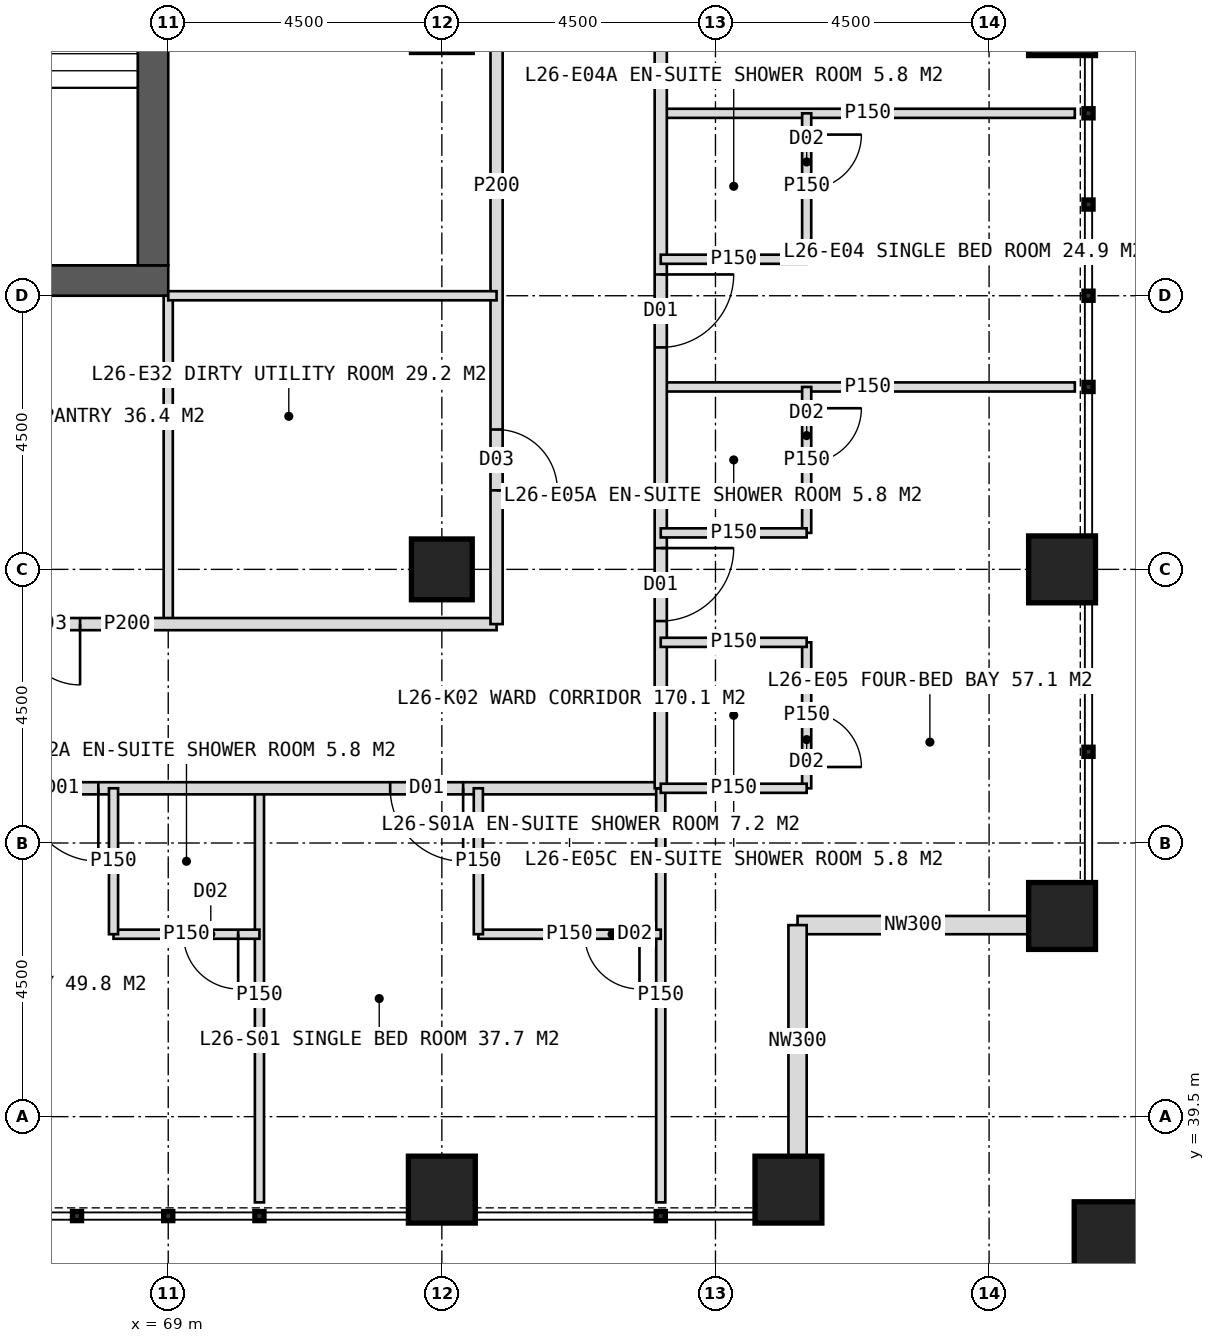
"""IFC4 building model, lengths in metres.
Left out: names, types, materials, properties, quantities, classifications, styles, units other than length and angle.
Written with IfcOpenShell. Run it as: python <this file> out.ifc"""

import sys

from ifc_helpers import new_model, si_unit, direction, frame, frame_2d, origin, origin_2d, place, context, subcontext, project, spatial, rectangle, hollow_rectangle, extrude, element, fill, save


model = new_model("IFC4")
c1 = context("Model", 3, precision=1e-05, world=origin(), true_north=direction((0.0, 1.0)))
c2 = subcontext(c1, "Body", "Model", "MODEL_VIEW")
j1 = project(units=[si_unit("LENGTHUNIT", "METRE"), si_unit("PLANEANGLEUNIT", "RADIAN")], contexts=[c1])
p1 = place(None, origin())
s1 = spatial("IfcSite", under=j1, at=p1, CompositionType="ELEMENT")
p2 = place(p1, origin())
s2 = spatial("IfcBuilding", under=s1, at=p2, CompositionType="ELEMENT")
p3 = place(p2, frame((0.0, 0.0, 112.0)))
s3 = spatial("IfcBuildingStorey", under=s2, at=p3, CompositionType="ELEMENT", Elevation=112.0)
p4 = place(p3, frame((51.0, 53.25, 0.0), z_axis=(0.0, 0.0, 1.0), x_axis=(1.0, 0.0, 0.0)))
e1 = element("IfcWall", 1, at=p4, inside=s3, PredefinedType="SHEAR", context=c2, shape_type="SweptSolid", body=[
    extrude(rectangle(XDim=18.0, YDim=0.5, at=frame_2d((9.0, 0.0))), origin(), (0.0, 0.0, 1.0), 4.0),
])
p5 = place(p4, frame((8.1, 0.0, 0.0)))
e2 = element("IfcOpeningElement", 2, at=p5, cuts=e1, PredefinedType="OPENING", context=c2, shape_type="SweptSolid", body=[
    extrude(rectangle(XDim=1.8, YDim=2.2, at=frame_2d((0.9, 1.1))), frame((0.0, 0.26, 0.0), z_axis=(0.0, -1.0, 0.0), x_axis=(1.0, 0.0, 0.0)), (0.0, 0.0, 1.0), 0.52),
])
p6 = place(p3, frame((68.75, 53.5, 0.0), z_axis=(0.0, 0.0, 1.0), x_axis=(0.0, 1.0, 0.0)))
e3 = element("IfcWall", 3, at=p6, inside=s3, PredefinedType="SHEAR", context=c2, shape_type="SweptSolid", body=[
    extrude(rectangle(XDim=17.0, YDim=0.5, at=frame_2d((8.5, 0.0))), origin(), (0.0, 0.0, 1.0), 4.0),
])
p7 = place(p6, frame((9.5, 0.0, 0.0)))
e4 = element("IfcOpeningElement", 4, at=p7, cuts=e3, PredefinedType="OPENING", context=c2, shape_type="SweptSolid", body=[
    extrude(rectangle(XDim=1.5, YDim=2.2, at=frame_2d((0.75, 1.1))), frame((0.0, 0.26, 0.0), z_axis=(0.0, -1.0, 0.0), x_axis=(1.0, 0.0, 0.0)), (0.0, 0.0, 1.0), 0.52),
])
p8 = place(p3, frame((73.5, 48.5, 0.0), z_axis=(0.0, 0.0, 1.0), x_axis=(1.0, 0.0, 0.0)))
e5 = element("IfcColumn", 5, at=p8, inside=s3, PredefinedType="COLUMN", context=c2, shape_type="SweptSolid", body=[
    extrude(hollow_rectangle(XDim=1.0, YDim=1.0, WallThickness=0.1, at=origin_2d()), origin(), (0.0, 0.0, 1.0), 4.0),
])
for number, where, z_axis, x_axis in (
    (6, (83.7, 42.8, 0.0), (0.0, 0.0, 1.0), (1.0, 0.0, 0.0)),
    (7, (83.7, 48.5, 0.0), (0.0, 0.0, 1.0), (1.0, 0.0, 0.0)),
    (8, (83.7, 57.5, 0.0), (0.0, 0.0, 1.0), (1.0, 0.0, 0.0)),
    (9, (73.5, 38.3, 0.0), (0.0, 0.0, 1.0), (1.0, 0.0, 0.0)),
    (10, (79.2, 38.3, 0.0), (0.0, 0.0, 1.0), (1.0, 0.0, 0.0)),
):
    element("IfcColumn", number, at=place(p3, frame(where, z_axis=z_axis, x_axis=x_axis)), inside=s3, PredefinedType="COLUMN", context=c2, shape_type="SweptSolid", body=[
        extrude(hollow_rectangle(XDim=1.1, YDim=1.1, WallThickness=0.1, at=origin_2d()), origin(), (0.0, 0.0, 1.0), 4.0),
    ])
p9 = place(p3, frame((84.6, 37.4, 0.0), z_axis=(0.0, 0.0, 1.0), x_axis=(1.0, 0.0, 0.0)))
e11 = element("IfcColumn", 11, at=p9, inside=s3, PredefinedType="COLUMN", context=c2, shape_type="SweptSolid", body=[
    extrude(hollow_rectangle(XDim=1.4, YDim=1.4, WallThickness=0.08, at=origin_2d()), origin(), (0.0, 0.0, 1.0), 4.0),
])
for number, where, z_axis, x_axis in (
    (12, (83.15, 42.65, 0.0), (0.0, 0.0, 1.0), (-1.0, 0.0, 0.0)),
    (13, (79.35, 42.65, 0.0), (0.0, 0.0, 1.0), (0.0, -1.0, 0.0)),
):
    element("IfcWall", number, at=place(p3, frame(where, z_axis=z_axis, x_axis=x_axis)), inside=s3, PredefinedType="ELEMENTEDWALL", context=c2, shape_type="SweptSolid", body=[
        extrude(rectangle(XDim=3.8, YDim=0.3, at=frame_2d((1.9, 0.0))), origin(), (0.0, 0.0, 1.0), 4.0),
    ])
p10 = place(p3, frame((70.5, 44.9, 0.0), z_axis=(0.0, 0.0, 1.0), x_axis=(0.0, -1.0, 0.0)))
e14 = element("IfcWall", 14, at=p10, inside=s3, PredefinedType="PARTITIONING", context=c2, shape_type="SweptSolid", body=[
    extrude(rectangle(XDim=6.81, YDim=0.15, at=frame_2d((3.405, 0.0))), origin(), (0.0, 0.0, 1.0), 3.75),
])
p11 = place(p3, frame((77.1, 44.9, 0.0), z_axis=(0.0, 0.0, 1.0), x_axis=(-1.0, 0.0, 0.0)))
e15 = element("IfcWall", 15, at=p11, inside=s3, PredefinedType="PARTITIONING", context=c2, shape_type="SweptSolid", body=[
    extrude(rectangle(XDim=34.2, YDim=0.2, at=frame_2d((17.1, 0.0))), origin(), (0.0, 0.0, 1.0), 3.75),
])
p12 = place(p11, frame((3.25, 0.0, 0.0)))
e16 = element("IfcOpeningElement", 16, at=p12, cuts=e15, PredefinedType="OPENING", context=c2, shape_type="SweptSolid", body=[
    extrude(rectangle(XDim=1.2, YDim=2.2, at=frame_2d((0.6, 1.1))), frame((0.0, 0.11, 0.0), z_axis=(0.0, -1.0, 0.0), x_axis=(1.0, 0.0, 0.0)), (0.0, 0.0, 1.0), 0.22),
])
p13 = place(p11, frame((9.25, 0.0, 0.0)))
e17 = element("IfcOpeningElement", 17, at=p13, cuts=e15, PredefinedType="OPENING", context=c2, shape_type="SweptSolid", body=[
    extrude(rectangle(XDim=1.2, YDim=2.2, at=frame_2d((0.6, 1.1))), frame((0.0, 0.11, 0.0), z_axis=(0.0, -1.0, 0.0), x_axis=(1.0, 0.0, 0.0)), (0.0, 0.0, 1.0), 0.22),
])
p14 = place(p11, frame((18.25, 0.0, 0.0)))
e18 = element("IfcOpeningElement", 18, at=p14, cuts=e15, PredefinedType="OPENING", context=c2, shape_type="SweptSolid", body=[
    extrude(rectangle(XDim=1.2, YDim=2.2, at=frame_2d((0.6, 1.1))), frame((0.0, 0.11, 0.0), z_axis=(0.0, -1.0, 0.0), x_axis=(1.0, 0.0, 0.0)), (0.0, 0.0, 1.0), 0.22),
])
p15 = place(p11, frame((27.25, 0.0, 0.0)))
e19 = element("IfcOpeningElement", 19, at=p15, cuts=e15, PredefinedType="OPENING", context=c2, shape_type="SweptSolid", body=[
    extrude(rectangle(XDim=1.2, YDim=2.2, at=frame_2d((0.6, 1.1))), frame((0.0, 0.11, 0.0), z_axis=(0.0, -1.0, 0.0), x_axis=(1.0, 0.0, 0.0)), (0.0, 0.0, 1.0), 0.22),
])
p16 = place(p3, frame((77.1, 44.9, 0.0), z_axis=(0.0, 0.0, 1.0), x_axis=(0.0, -1.0, 0.0)))
e20 = element("IfcWall", 20, at=p16, inside=s3, PredefinedType="PARTITIONING", context=c2, shape_type="SweptSolid", body=[
    extrude(rectangle(XDim=6.81, YDim=0.15, at=frame_2d((3.405, 0.0))), origin(), (0.0, 0.0, 1.0), 3.75),
])
p17 = place(p3, frame((77.1, 42.5, 0.0), z_axis=(0.0, 0.0, 1.0), x_axis=(-1.0, 0.0, 0.0)))
e21 = element("IfcWall", 21, at=p17, inside=s3, PredefinedType="PARTITIONING", context=c2, shape_type="SweptSolid", body=[
    extrude(rectangle(XDim=3.0, YDim=0.15, at=frame_2d((1.5, 0.0))), origin(), (0.0, 0.0, 1.0), 3.75),
])
p18 = place(p17, frame((0.35, 0.0, 0.0)))
e22 = element("IfcOpeningElement", 22, at=p18, cuts=e21, PredefinedType="OPENING", context=c2, shape_type="SweptSolid", body=[
    extrude(rectangle(XDim=0.9, YDim=2.1, at=frame_2d((0.45, 1.05))), frame((0.0, 0.085, 0.0), z_axis=(0.0, -1.0, 0.0), x_axis=(1.0, 0.0, 0.0)), (0.0, 0.0, 1.0), 0.17),
])
p19 = place(p3, frame((74.1, 44.9, 0.0), z_axis=(0.0, 0.0, 1.0), x_axis=(0.0, -1.0, 0.0)))
e23 = element("IfcWall", 23, at=p19, inside=s3, PredefinedType="PARTITIONING", context=c2, shape_type="SweptSolid", body=[
    extrude(rectangle(XDim=2.4, YDim=0.15, at=frame_2d((1.2, 0.0))), origin(), (0.0, 0.0, 1.0), 3.75),
])
p20 = place(p3, frame((70.5, 42.5, 0.0), z_axis=(0.0, 0.0, 1.0), x_axis=(-1.0, 0.0, 0.0)))
e24 = element("IfcWall", 24, at=p20, inside=s3, PredefinedType="PARTITIONING", context=c2, shape_type="SweptSolid", body=[
    extrude(rectangle(XDim=2.4, YDim=0.15, at=frame_2d((1.2, 0.0))), origin(), (0.0, 0.0, 1.0), 3.75),
])
p21 = place(p20, frame((0.35, 0.0, 0.0)))
e25 = element("IfcOpeningElement", 25, at=p21, cuts=e24, PredefinedType="OPENING", context=c2, shape_type="SweptSolid", body=[
    extrude(rectangle(XDim=0.9, YDim=2.1, at=frame_2d((0.45, 1.05))), frame((0.0, 0.085, 0.0), z_axis=(0.0, -1.0, 0.0), x_axis=(1.0, 0.0, 0.0)), (0.0, 0.0, 1.0), 0.17),
])
p22 = place(p3, frame((68.1, 44.9, 0.0), z_axis=(0.0, 0.0, 1.0), x_axis=(0.0, -1.0, 0.0)))
e26 = element("IfcWall", 26, at=p22, inside=s3, PredefinedType="PARTITIONING", context=c2, shape_type="SweptSolid", body=[
    extrude(rectangle(XDim=2.4, YDim=0.15, at=frame_2d((1.2, 0.0))), origin(), (0.0, 0.0, 1.0), 3.75),
])
p23 = place(p3, frame((69.0, 53.0, 0.0), z_axis=(0.0, 0.0, 1.0), x_axis=(0.0, -1.0, 0.0)))
e27 = element("IfcWall", 27, at=p23, inside=s3, PredefinedType="PARTITIONING", context=c2, shape_type="SweptSolid", body=[
    extrude(rectangle(XDim=5.4, YDim=0.15, at=frame_2d((2.7, 0.0))), origin(), (0.0, 0.0, 1.0), 3.75),
])
p24 = place(p3, frame((74.4, 47.6, 0.0), z_axis=(0.0, 0.0, 1.0), x_axis=(-1.0, 0.0, 0.0)))
e28 = element("IfcWall", 28, at=p24, inside=s3, PredefinedType="PARTITIONING", context=c2, shape_type="SweptSolid", body=[
    extrude(rectangle(XDim=12.15, YDim=0.2, at=frame_2d((6.075, 0.0))), origin(), (0.0, 0.0, 1.0), 3.75),
])
p25 = place(p24, frame((6.85, 0.0, 0.0)))
e29 = element("IfcOpeningElement", 29, at=p25, cuts=e28, PredefinedType="OPENING", context=c2, shape_type="SweptSolid", body=[
    extrude(rectangle(XDim=1.0, YDim=2.1, at=frame_2d((0.5, 1.05))), frame((0.0, 0.11, 0.0), z_axis=(0.0, -1.0, 0.0), x_axis=(1.0, 0.0, 0.0)), (0.0, 0.0, 1.0), 0.22),
])
for number, where, z_axis, x_axis in (
    (30, (77.1, 56.0, 0.0), (0.0, 0.0, 1.0), (1.0, 0.0, 0.0)),
    (31, (77.1, 51.5, 0.0), (0.0, 0.0, 1.0), (1.0, 0.0, 0.0)),
):
    element("IfcWall", number, at=place(p3, frame(where, z_axis=z_axis, x_axis=x_axis)), inside=s3, PredefinedType="PARTITIONING", context=c2, shape_type="SweptSolid", body=[
        extrude(rectangle(XDim=6.81, YDim=0.15, at=frame_2d((3.405, 0.0))), origin(), (0.0, 0.0, 1.0), 3.75),
    ])
p26 = place(p3, frame((77.1, 79.1, 0.0), z_axis=(0.0, 0.0, 1.0), x_axis=(0.0, -1.0, 0.0)))
e32 = element("IfcWall", 32, at=p26, inside=s3, PredefinedType="PARTITIONING", context=c2, shape_type="SweptSolid", body=[
    extrude(rectangle(XDim=34.2, YDim=0.2, at=frame_2d((17.1, 0.0))), origin(), (0.0, 0.0, 1.0), 3.75),
])
p27 = place(p26, frame((2.65, 0.0, 0.0)))
e33 = element("IfcOpeningElement", 33, at=p27, cuts=e32, PredefinedType="OPENING", context=c2, shape_type="SweptSolid", body=[
    extrude(rectangle(XDim=1.2, YDim=2.2, at=frame_2d((0.6, 1.1))), frame((0.0, 0.11, 0.0), z_axis=(0.0, -1.0, 0.0), x_axis=(1.0, 0.0, 0.0)), (0.0, 0.0, 1.0), 0.22),
])
p28 = place(p26, frame((10.75, 0.0, 0.0)))
e34 = element("IfcOpeningElement", 34, at=p28, cuts=e32, PredefinedType="OPENING", context=c2, shape_type="SweptSolid", body=[
    extrude(rectangle(XDim=1.2, YDim=2.2, at=frame_2d((0.6, 1.1))), frame((0.0, 0.11, 0.0), z_axis=(0.0, -1.0, 0.0), x_axis=(1.0, 0.0, 0.0)), (0.0, 0.0, 1.0), 0.22),
])
p29 = place(p26, frame((19.75, 0.0, 0.0)))
e35 = element("IfcOpeningElement", 35, at=p29, cuts=e32, PredefinedType="OPENING", context=c2, shape_type="SweptSolid", body=[
    extrude(rectangle(XDim=1.2, YDim=2.2, at=frame_2d((0.6, 1.1))), frame((0.0, 0.11, 0.0), z_axis=(0.0, -1.0, 0.0), x_axis=(1.0, 0.0, 0.0)), (0.0, 0.0, 1.0), 0.22),
])
p30 = place(p26, frame((25.75, 0.0, 0.0)))
e36 = element("IfcOpeningElement", 36, at=p30, cuts=e32, PredefinedType="OPENING", context=c2, shape_type="SweptSolid", body=[
    extrude(rectangle(XDim=1.2, YDim=2.2, at=frame_2d((0.6, 1.1))), frame((0.0, 0.11, 0.0), z_axis=(0.0, -1.0, 0.0), x_axis=(1.0, 0.0, 0.0)), (0.0, 0.0, 1.0), 0.22),
])
p31 = place(p26, frame((30.25, 0.0, 0.0)))
e37 = element("IfcOpeningElement", 37, at=p31, cuts=e32, PredefinedType="OPENING", context=c2, shape_type="SweptSolid", body=[
    extrude(rectangle(XDim=1.2, YDim=2.2, at=frame_2d((0.6, 1.1))), frame((0.0, 0.11, 0.0), z_axis=(0.0, -1.0, 0.0), x_axis=(1.0, 0.0, 0.0)), (0.0, 0.0, 1.0), 0.22),
])
p32 = place(p3, frame((79.5, 56.0, 0.0), z_axis=(0.0, 0.0, 1.0), x_axis=(0.0, -1.0, 0.0)))
e38 = element("IfcWall", 38, at=p32, inside=s3, PredefinedType="PARTITIONING", context=c2, shape_type="SweptSolid", body=[
    extrude(rectangle(XDim=2.4, YDim=0.15, at=frame_2d((1.2, 0.0))), origin(), (0.0, 0.0, 1.0), 3.75),
])
p33 = place(p32, frame((0.35, 0.0, 0.0)))
e39 = element("IfcOpeningElement", 39, at=p33, cuts=e38, PredefinedType="OPENING", context=c2, shape_type="SweptSolid", body=[
    extrude(rectangle(XDim=0.9, YDim=2.1, at=frame_2d((0.45, 1.05))), frame((0.0, 0.085, 0.0), z_axis=(0.0, -1.0, 0.0), x_axis=(1.0, 0.0, 0.0)), (0.0, 0.0, 1.0), 0.17),
])
p34 = place(p3, frame((77.1, 53.6, 0.0), z_axis=(0.0, 0.0, 1.0), x_axis=(1.0, 0.0, 0.0)))
e40 = element("IfcWall", 40, at=p34, inside=s3, PredefinedType="PARTITIONING", context=c2, shape_type="SweptSolid", body=[
    extrude(rectangle(XDim=2.4, YDim=0.15, at=frame_2d((1.2, 0.0))), origin(), (0.0, 0.0, 1.0), 3.75),
])
p35 = place(p3, frame((79.5, 51.5, 0.0), z_axis=(0.0, 0.0, 1.0), x_axis=(0.0, -1.0, 0.0)))
e41 = element("IfcWall", 41, at=p35, inside=s3, PredefinedType="PARTITIONING", context=c2, shape_type="SweptSolid", body=[
    extrude(rectangle(XDim=2.4, YDim=0.15, at=frame_2d((1.2, 0.0))), origin(), (0.0, 0.0, 1.0), 3.75),
])
p36 = place(p35, frame((0.35, 0.0, 0.0)))
e42 = element("IfcOpeningElement", 42, at=p36, cuts=e41, PredefinedType="OPENING", context=c2, shape_type="SweptSolid", body=[
    extrude(rectangle(XDim=0.9, YDim=2.1, at=frame_2d((0.45, 1.05))), frame((0.0, 0.085, 0.0), z_axis=(0.0, -1.0, 0.0), x_axis=(1.0, 0.0, 0.0)), (0.0, 0.0, 1.0), 0.17),
])
p37 = place(p3, frame((77.1, 49.1, 0.0), z_axis=(0.0, 0.0, 1.0), x_axis=(1.0, 0.0, 0.0)))
e43 = element("IfcWall", 43, at=p37, inside=s3, PredefinedType="PARTITIONING", context=c2, shape_type="SweptSolid", body=[
    extrude(rectangle(XDim=2.4, YDim=0.15, at=frame_2d((1.2, 0.0))), origin(), (0.0, 0.0, 1.0), 3.75),
])
p38 = place(p3, frame((79.5, 47.3, 0.0), z_axis=(0.0, 0.0, 1.0), x_axis=(0.0, -1.0, 0.0)))
e44 = element("IfcWall", 44, at=p38, inside=s3, PredefinedType="PARTITIONING", context=c2, shape_type="SweptSolid", body=[
    extrude(rectangle(XDim=2.4, YDim=0.15, at=frame_2d((1.2, 0.0))), origin(), (0.0, 0.0, 1.0), 3.75),
])
p39 = place(p38, frame((1.15, 0.0, 0.0)))
e45 = element("IfcOpeningElement", 45, at=p39, cuts=e44, PredefinedType="OPENING", context=c2, shape_type="SweptSolid", body=[
    extrude(rectangle(XDim=0.9, YDim=2.1, at=frame_2d((0.45, 1.05))), frame((0.0, 0.085, 0.0), z_axis=(0.0, -1.0, 0.0), x_axis=(1.0, 0.0, 0.0)), (0.0, 0.0, 1.0), 0.17),
])
for number, where, z_axis, x_axis in (
    (46, (77.1, 47.3, 0.0), (0.0, 0.0, 1.0), (1.0, 0.0, 0.0)),
    (47, (77.1, 44.9, 0.0), (0.0, 0.0, 1.0), (1.0, 0.0, 0.0)),
):
    element("IfcWall", number, at=place(p3, frame(where, z_axis=z_axis, x_axis=x_axis)), inside=s3, PredefinedType="PARTITIONING", context=c2, shape_type="SweptSolid", body=[
        extrude(rectangle(XDim=2.4, YDim=0.15, at=frame_2d((1.2, 0.0))), origin(), (0.0, 0.0, 1.0), 3.75),
    ])
p40 = place(p3, frame((74.4, 62.0, 0.0), z_axis=(0.0, 0.0, 1.0), x_axis=(0.0, -1.0, 0.0)))
e48 = element("IfcWall", 48, at=p40, inside=s3, PredefinedType="PARTITIONING", context=c2, shape_type="SweptSolid", body=[
    extrude(rectangle(XDim=14.4, YDim=0.2, at=frame_2d((7.2, 0.0))), origin(), (0.0, 0.0, 1.0), 3.75),
])
p41 = place(p40, frame((1.45, 0.0, 0.0)))
e49 = element("IfcOpeningElement", 49, at=p41, cuts=e48, PredefinedType="OPENING", context=c2, shape_type="SweptSolid", body=[
    extrude(rectangle(XDim=1.0, YDim=2.1, at=frame_2d((0.5, 1.05))), frame((0.0, 0.11, 0.0), z_axis=(0.0, -1.0, 0.0), x_axis=(1.0, 0.0, 0.0)), (0.0, 0.0, 1.0), 0.22),
])
p42 = place(p40, frame((11.2, 0.0, 0.0)))
e50 = element("IfcOpeningElement", 50, at=p42, cuts=e48, PredefinedType="OPENING", context=c2, shape_type="SweptSolid", body=[
    extrude(rectangle(XDim=1.0, YDim=2.1, at=frame_2d((0.5, 1.05))), frame((0.0, 0.11, 0.0), z_axis=(0.0, -1.0, 0.0), x_axis=(1.0, 0.0, 0.0)), (0.0, 0.0, 1.0), 0.22),
])
p43 = place(p3, frame((69.0, 53.0, 0.0), z_axis=(0.0, 0.0, 1.0), x_axis=(1.0, 0.0, 0.0)))
e51 = element("IfcWall", 51, at=p43, inside=s3, PredefinedType="PARTITIONING", context=c2, shape_type="SweptSolid", body=[
    extrude(rectangle(XDim=5.4, YDim=0.15, at=frame_2d((2.7, 0.0))), origin(), (0.0, 0.0, 1.0), 3.75),
])
p44 = place(p12, origin())
e52 = element("IfcDoor", 52, at=p44, inside=s3, OperationType="SINGLE_SWING_LEFT", PredefinedType="DOOR", context=c2, shape_type="SweptSolid", body=[
    extrude(rectangle(XDim=1.2, YDim=2.2, at=frame_2d((0.6, 1.1))), frame((0.0, 0.025, 0.0), z_axis=(0.0, -1.0, 0.0), x_axis=(1.0, 0.0, 0.0)), (0.0, 0.0, 1.0), 0.05),
])
fill(e16, e52)
p45 = place(p18, origin())
e53 = element("IfcDoor", 53, at=p45, inside=s3, OperationType="SINGLE_SWING_LEFT", PredefinedType="DOOR", context=c2, shape_type="SweptSolid", body=[
    extrude(rectangle(XDim=0.9, YDim=2.1, at=frame_2d((0.45, 1.05))), frame((0.0, 0.025, 0.0), z_axis=(0.0, -1.0, 0.0), x_axis=(1.0, 0.0, 0.0)), (0.0, 0.0, 1.0), 0.05),
])
fill(e22, e53)
p46 = place(p13, origin())
e54 = element("IfcDoor", 54, at=p46, inside=s3, OperationType="SINGLE_SWING_LEFT", PredefinedType="DOOR", context=c2, shape_type="SweptSolid", body=[
    extrude(rectangle(XDim=1.2, YDim=2.2, at=frame_2d((0.6, 1.1))), frame((0.0, 0.025, 0.0), z_axis=(0.0, -1.0, 0.0), x_axis=(1.0, 0.0, 0.0)), (0.0, 0.0, 1.0), 0.05),
])
fill(e17, e54)
p47 = place(p21, origin())
e55 = element("IfcDoor", 55, at=p47, inside=s3, OperationType="SINGLE_SWING_LEFT", PredefinedType="DOOR", context=c2, shape_type="SweptSolid", body=[
    extrude(rectangle(XDim=0.9, YDim=2.1, at=frame_2d((0.45, 1.05))), frame((0.0, 0.025, 0.0), z_axis=(0.0, -1.0, 0.0), x_axis=(1.0, 0.0, 0.0)), (0.0, 0.0, 1.0), 0.05),
])
fill(e25, e55)
p48 = place(p25, origin())
e56 = element("IfcDoor", 56, at=p48, inside=s3, OperationType="SINGLE_SWING_LEFT", PredefinedType="DOOR", context=c2, shape_type="SweptSolid", body=[
    extrude(rectangle(XDim=1.0, YDim=2.1, at=frame_2d((0.5, 1.05))), frame((0.0, 0.025, 0.0), z_axis=(0.0, -1.0, 0.0), x_axis=(1.0, 0.0, 0.0)), (0.0, 0.0, 1.0), 0.05),
])
fill(e29, e56)
p49 = place(p30, origin())
e57 = element("IfcDoor", 57, at=p49, inside=s3, OperationType="SINGLE_SWING_LEFT", PredefinedType="DOOR", context=c2, shape_type="SweptSolid", body=[
    extrude(rectangle(XDim=1.2, YDim=2.2, at=frame_2d((0.6, 1.1))), frame((0.0, 0.025, 0.0), z_axis=(0.0, -1.0, 0.0), x_axis=(1.0, 0.0, 0.0)), (0.0, 0.0, 1.0), 0.05),
])
fill(e36, e57)
p50 = place(p33, origin())
e58 = element("IfcDoor", 58, at=p50, inside=s3, OperationType="SINGLE_SWING_LEFT", PredefinedType="DOOR", context=c2, shape_type="SweptSolid", body=[
    extrude(rectangle(XDim=0.9, YDim=2.1, at=frame_2d((0.45, 1.05))), frame((0.0, 0.025, 0.0), z_axis=(0.0, -1.0, 0.0), x_axis=(1.0, 0.0, 0.0)), (0.0, 0.0, 1.0), 0.05),
])
fill(e39, e58)
p51 = place(p31, origin())
e59 = element("IfcDoor", 59, at=p51, inside=s3, OperationType="SINGLE_SWING_LEFT", PredefinedType="DOOR", context=c2, shape_type="SweptSolid", body=[
    extrude(rectangle(XDim=1.2, YDim=2.2, at=frame_2d((0.6, 1.1))), frame((0.0, 0.025, 0.0), z_axis=(0.0, -1.0, 0.0), x_axis=(1.0, 0.0, 0.0)), (0.0, 0.0, 1.0), 0.05),
])
fill(e37, e59)
p52 = place(p36, origin())
e60 = element("IfcDoor", 60, at=p52, inside=s3, OperationType="SINGLE_SWING_LEFT", PredefinedType="DOOR", context=c2, shape_type="SweptSolid", body=[
    extrude(rectangle(XDim=0.9, YDim=2.1, at=frame_2d((0.45, 1.05))), frame((0.0, 0.025, 0.0), z_axis=(0.0, -1.0, 0.0), x_axis=(1.0, 0.0, 0.0)), (0.0, 0.0, 1.0), 0.05),
])
fill(e42, e60)
p53 = place(p39, origin())
e61 = element("IfcDoor", 61, at=p53, inside=s3, OperationType="SINGLE_SWING_RIGHT", PredefinedType="DOOR", context=c2, shape_type="SweptSolid", body=[
    extrude(rectangle(XDim=0.9, YDim=2.1, at=frame_2d((0.45, 1.05))), frame((0.0, 0.025, 0.0), z_axis=(0.0, -1.0, 0.0), x_axis=(1.0, 0.0, 0.0)), (0.0, 0.0, 1.0), 0.05),
])
fill(e45, e61)
p54 = place(p42, origin())
e62 = element("IfcDoor", 62, at=p54, inside=s3, OperationType="SINGLE_SWING_RIGHT", PredefinedType="DOOR", context=c2, shape_type="SweptSolid", body=[
    extrude(rectangle(XDim=1.0, YDim=2.1, at=frame_2d((0.5, 1.05))), frame((0.0, 0.025, 0.0), z_axis=(0.0, -1.0, 0.0), x_axis=(1.0, 0.0, 0.0)), (0.0, 0.0, 1.0), 0.05),
])
fill(e50, e62)
save(model, sys.argv[1])
